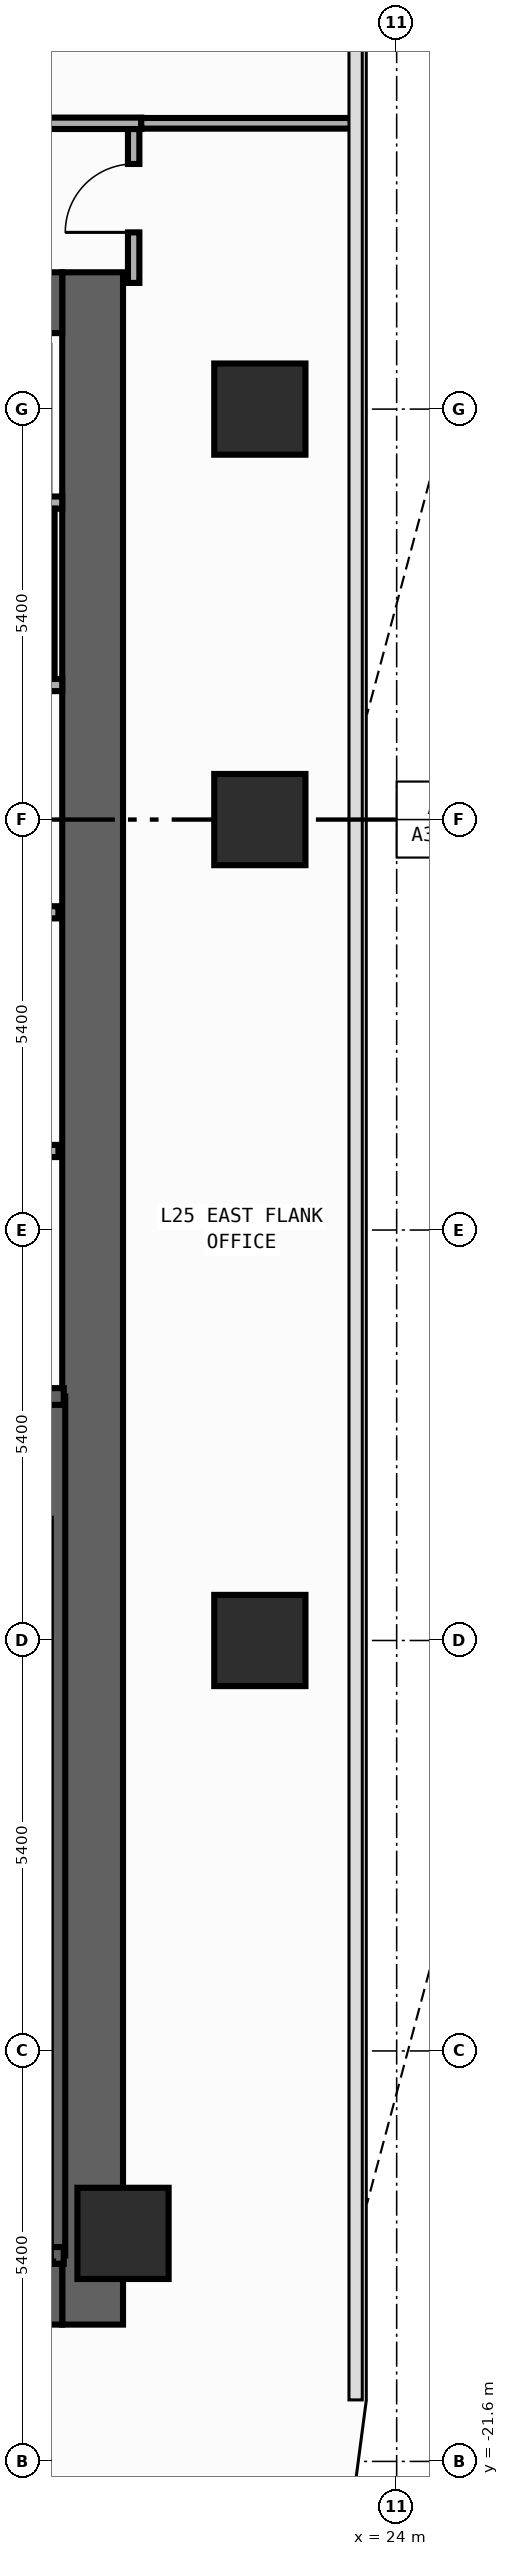
"""IFC4 building model, lengths in metres.
Left out: names, types, materials, properties, quantities, classifications, styles, units other than length and angle.
Written with IfcOpenShell. Run it as: python <this file> out.ifc"""

import sys

from ifc_helpers import new_model, si_unit, direction, frame, frame_2d, origin, origin_2d, place, context, subcontext, project, spatial, rectangle, extrude, element, fill, save


model = new_model("IFC4")
c1 = context("Model", 3, precision=1e-05, world=origin(), true_north=direction((0.0, 1.0)))
c2 = subcontext(c1, "Body", "Model", "MODEL_VIEW")
j1 = project(units=[si_unit("LENGTHUNIT", "METRE"), si_unit("PLANEANGLEUNIT", "RADIAN")], contexts=[c1])
p1 = place(None, origin())
s1 = spatial("IfcSite", under=j1, at=p1, CompositionType="ELEMENT")
p2 = place(p1, origin())
s2 = spatial("IfcBuilding", under=s1, at=p2, CompositionType="ELEMENT")
p3 = place(p2, frame((0.0, 0.0, 110.0)))
s3 = spatial("IfcBuildingStorey", under=s2, at=p3, CompositionType="ELEMENT", Elevation=110.0)
p4 = place(p3, frame((20.0, -19.8, 0.0), z_axis=(0.0, 0.0, 1.0), x_axis=(0.0, 1.0, 0.0)))
e1 = element("IfcWall", 1, at=p4, inside=s3, PredefinedType="SHEAR", context=c2, shape_type="SweptSolid", body=[
    extrude(rectangle(XDim=27.0, YDim=0.8, at=frame_2d((13.5, 0.0))), origin(), (0.0, 0.0, 1.0), 3.94),
])
for number, where, z_axis, x_axis in (
    (2, (12.8, -19.4, 0.0), (0.0, 0.0, 1.0), (1.0, 0.0, 0.0)),
    (3, (12.8, 6.8, 0.0), (0.0, 0.0, 1.0), (1.0, 0.0, 0.0)),
):
    element("IfcWall", number, at=place(p3, frame(where, z_axis=z_axis, x_axis=x_axis)), inside=s3, PredefinedType="SHEAR", context=c2, shape_type="SweptSolid", body=[
        extrude(rectangle(XDim=6.8, YDim=0.8, at=frame_2d((3.4, 0.0))), origin(), (0.0, 0.0, 1.0), 3.94),
    ])
p5 = place(p3, frame((19.53, -18.89, 0.0), z_axis=(0.0, 0.0, 1.0), x_axis=(0.0, 1.0, 0.0)))
e4 = element("IfcWall", 4, at=p5, inside=s3, PredefinedType="SHEAR", context=c2, shape_type="SweptSolid", body=[
    extrude(rectangle(XDim=11.3, YDim=0.22, at=frame_2d((5.65, 0.0))), origin(), (0.0, 0.0, 1.0), 3.94),
])
p6 = place(p3, frame((15.705, -18.89, 0.0), z_axis=(0.0, 0.0, 1.0), x_axis=(1.0, 0.0, 0.0)))
e5 = element("IfcWall", 5, at=p6, inside=s3, PredefinedType="SHEAR", context=c2, shape_type="SweptSolid", body=[
    extrude(rectangle(XDim=3.915, YDim=0.22, at=frame_2d((1.958, 0.0))), origin(), (0.0, 0.0, 1.0), 3.94),
])
p7 = place(p3, frame((19.62, -7.59, 0.0), z_axis=(0.0, 0.0, 1.0), x_axis=(-1.0, 0.0, 0.0)))
e6 = element("IfcWall", 6, at=p7, inside=s3, PredefinedType="SHEAR", context=c2, shape_type="SweptSolid", body=[
    extrude(rectangle(XDim=3.915, YDim=0.22, at=frame_2d((1.958, 0.0))), origin(), (0.0, 0.0, 1.0), 3.94),
])
p8 = place(p7, frame((1.08, 0.0, 0.0)))
e7 = element("IfcOpeningElement", 7, at=p8, cuts=e6, PredefinedType="OPENING", context=c2, shape_type="SweptSolid", body=[
    extrude(rectangle(XDim=1.1, YDim=2.2, at=frame_2d((0.55, 1.1))), frame((0.0, 0.12, 0.0), z_axis=(0.0, -1.0, 0.0), x_axis=(1.0, 0.0, 0.0)), (0.0, 0.0, 1.0), 0.24),
])
for number, where, z_axis, x_axis in (
    (8, (20.4, -18.6, 0.0), (0.0, 0.0, 1.0), (1.0, 0.0, 0.0)),
    (9, (22.2, -10.8, 0.0), (0.0, 0.0, 1.0), (1.0, 0.0, 0.0)),
    (10, (22.2, 0.0, 0.0), (0.0, 0.0, 1.0), (1.0, 0.0, 0.0)),
    (11, (22.2, 5.4, 0.0), (0.0, 0.0, 1.0), (1.0, 0.0, 0.0)),
):
    element("IfcColumn", number, at=place(p3, frame(where, z_axis=z_axis, x_axis=x_axis)), inside=s3, PredefinedType="COLUMN", context=c2, shape_type="SweptSolid", body=[
        extrude(rectangle(XDim=1.2, YDim=1.2, at=origin_2d()), origin(), (0.0, 0.0, 1.0), 4.2),
    ])
p9 = place(p3, frame((15.75, -4.36, 0.0), z_axis=(0.0, 0.0, 1.0), x_axis=(1.0, 0.0, 0.0)))
e12 = element("IfcWall", 12, at=p9, inside=s3, PredefinedType="STANDARD", context=c2, shape_type="SweptSolid", body=[
    extrude(rectangle(XDim=3.8, YDim=0.16, at=frame_2d((1.9, 0.0))), origin(), (0.0, 0.0, 1.0), 3.94),
])
p10 = place(p9, frame((1.47, 0.0, 0.0)))
e13 = element("IfcOpeningElement", 13, at=p10, cuts=e12, PredefinedType="OPENING", context=c2, shape_type="SweptSolid", body=[
    extrude(rectangle(XDim=1.15, YDim=2.2, at=frame_2d((0.575, 1.1))), frame((0.0, 0.09, 0.0), z_axis=(0.0, -1.0, 0.0), x_axis=(1.0, 0.0, 0.0)), (0.0, 0.0, 1.0), 0.18),
])
p11 = place(p3, frame((15.75, -1.22, 0.0), z_axis=(0.0, 0.0, 1.0), x_axis=(1.0, 0.0, 0.0)))
e14 = element("IfcWall", 14, at=p11, inside=s3, PredefinedType="STANDARD", context=c2, shape_type="SweptSolid", body=[
    extrude(rectangle(XDim=3.8, YDim=0.16, at=frame_2d((1.9, 0.0))), origin(), (0.0, 0.0, 1.0), 3.94),
])
for number, where, z_axis, x_axis in (
    (15, (17.31, 4.17, 0.0), (0.0, 0.0, 1.0), (1.0, 0.0, 0.0)),
    (16, (17.31, 1.77, 0.0), (0.0, 0.0, 1.0), (1.0, 0.0, 0.0)),
):
    element("IfcWall", number, at=place(p3, frame(where, z_axis=z_axis, x_axis=x_axis)), inside=s3, PredefinedType="PARTITIONING", context=c2, shape_type="SweptSolid", body=[
        extrude(rectangle(XDim=2.29, YDim=0.16, at=frame_2d((1.145, 0.0))), origin(), (0.0, 0.0, 1.0), 3.94),
    ])
p12 = place(p3, frame((20.54, 7.06, 0.0), z_axis=(0.0, 0.0, 1.0), x_axis=(0.0, 1.0, 0.0)))
e17 = element("IfcWall", 17, at=p12, inside=s3, PredefinedType="PARTITIONING", context=c2, shape_type="SweptSolid", body=[
    extrude(rectangle(XDim=2.025, YDim=0.15, at=frame_2d((1.012, 0.0))), origin(), (0.0, 0.0, 1.0), 3.94),
])
p13 = place(p12, frame((0.665, 0.0, 0.0)))
e18 = element("IfcOpeningElement", 18, at=p13, cuts=e17, PredefinedType="OPENING", context=c2, shape_type="SweptSolid", body=[
    extrude(rectangle(XDim=0.9, YDim=2.15, at=frame_2d((0.45, 1.075))), frame((0.0, 0.085, 0.0), z_axis=(0.0, -1.0, 0.0), x_axis=(1.0, 0.0, 0.0)), (0.0, 0.0, 1.0), 0.17),
])
p14 = place(p3, frame((11.81, 9.16, 0.0), z_axis=(0.0, 0.0, 1.0), x_axis=(1.0, 0.0, 0.0)))
e19 = element("IfcWall", 19, at=p14, inside=s3, PredefinedType="PARTITIONING", context=c2, shape_type="SweptSolid", body=[
    extrude(rectangle(XDim=8.83, YDim=0.15, at=frame_2d((4.415, 0.0))), origin(), (0.0, 0.0, 1.0), 3.94),
])
p15 = place(p14, frame((5.067, 0.0, 0.0)))
e20 = element("IfcOpeningElement", 20, at=p15, cuts=e19, PredefinedType="OPENING", context=c2, shape_type="SweptSolid", body=[
    extrude(rectangle(XDim=0.9, YDim=2.15, at=frame_2d((0.45, 1.075))), frame((0.0, 0.085, 0.0), z_axis=(0.0, -1.0, 0.0), x_axis=(1.0, 0.0, 0.0)), (0.0, 0.0, 1.0), 0.17),
])
p16 = place(p3, frame((20.64, 9.16, 0.0), z_axis=(0.0, 0.0, 1.0), x_axis=(1.0, 0.0, 0.0)))
e21 = element("IfcWall", 21, at=p16, inside=s3, PredefinedType="PARTITIONING", context=c2, shape_type="SweptSolid", body=[
    extrude(rectangle(XDim=2.815, YDim=0.14, at=frame_2d((1.408, 0.0))), origin(), (0.0, 0.0, 1.0), 3.94),
])
p17 = place(p3, frame((19.45, 4.09, 0.0), z_axis=(0.0, 0.0, 1.0), x_axis=(0.0, -1.0, 0.0)))
e22 = element("IfcWall", 22, at=p17, inside=s3, PredefinedType="PARTITIONING", context=c2, shape_type="SweptSolid", body=[
    extrude(rectangle(XDim=2.24, YDim=0.1, at=frame_2d((1.12, 0.0))), origin(), (0.0, 0.0, 1.0), 3.94),
])
p18 = place(p13, origin())
e23 = element("IfcDoor", 23, at=p18, inside=s3, OperationType="SINGLE_SWING_LEFT", PredefinedType="DOOR", context=c2, shape_type="SweptSolid", body=[
    extrude(rectangle(XDim=0.9, YDim=2.15, at=frame_2d((0.45, 1.075))), frame((0.0, 0.025, 0.0), z_axis=(0.0, -1.0, 0.0), x_axis=(1.0, 0.0, 0.0)), (0.0, 0.0, 1.0), 0.05),
])
fill(e18, e23)
save(model, sys.argv[1])
